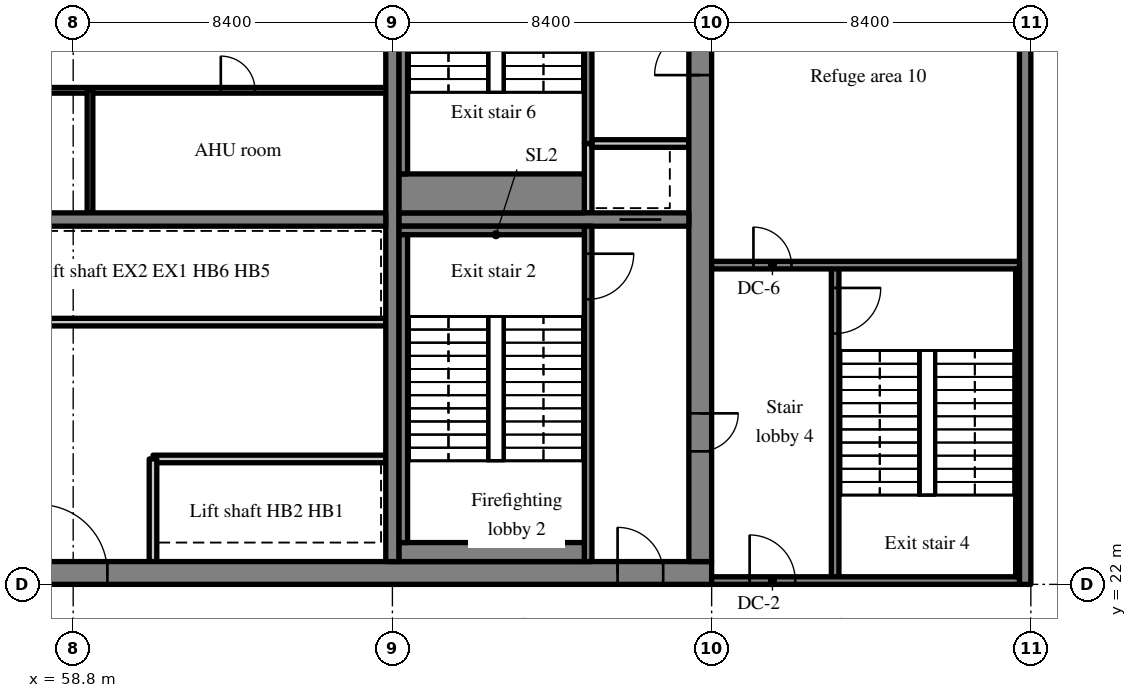
"""IFC4 building model, lengths in metres.
Left out: names, types, materials, properties, quantities, classifications, styles, units other than length and angle.
Written with IfcOpenShell. Run it as: python <this file> out.ifc"""

import sys

from ifc_helpers import new_model, si_unit, direction, frame, frame_2d, origin, place, context, subcontext, project, spatial, rectangle, extrude, source, transform, mapped, element, fill, save


model = new_model("IFC4")
c1 = context("Model", 3, precision=1e-05, world=origin(), true_north=direction((0.0, 1.0)))
c2 = subcontext(c1, "Body", "Model", "MODEL_VIEW")
j1 = project(units=[si_unit("LENGTHUNIT", "METRE"), si_unit("PLANEANGLEUNIT", "RADIAN")], contexts=[c1])
p1 = place(None, origin())
s1 = spatial("IfcSite", under=j1, at=p1, CompositionType="ELEMENT")
p2 = place(p1, origin())
s2 = spatial("IfcBuilding", under=s1, at=p2, CompositionType="ELEMENT")
p3 = place(p2, frame((0.0, 0.0, 206.4)))
s3 = spatial("IfcBuildingStorey", under=s2, at=p3, CompositionType="ELEMENT", Elevation=206.4)
m1 = source(origin(), c2, "Body", "SweptSolid", [
    extrude(rectangle(XDim=50.4, YDim=0.6, at=frame_2d((25.2, 0.0))), origin(), (0.0, 0.0, 1.0), 7.32),
])
p4 = place(p3, frame((25.2, 22.3, 0.0), z_axis=(0.0, 0.0, 1.0), x_axis=(1.0, 0.0, 0.0)))
e1 = element("IfcWall", 1, at=p4, inside=s3, PredefinedType="SHEAR", context=c2, shape_type="MappedRepresentation", body=[
    mapped(m1, transform((0.0, 0.0, 0.0), scale=1.0)),
])
m2 = source(origin(), c2, "Body", "SweptSolid", [
    extrude(rectangle(XDim=1.2, YDim=2.1, at=frame_2d((0.6, 1.05))), frame((0.0, 0.31, 0.0), z_axis=(0.0, -1.0, 0.0), x_axis=(1.0, 0.0, 0.0)), (0.0, 0.0, 1.0), 0.62),
])
p5 = place(p4, frame((22.262, 0.0, 0.0)))
e2 = element("IfcOpeningElement", 2, at=p5, cuts=e1, PredefinedType="OPENING", context=c2, shape_type="MappedRepresentation", body=[
    mapped(m2, transform((0.0, 0.0, 0.0), scale=1.0)),
])
m3 = source(origin(), c2, "Body", "SweptSolid", [
    extrude(rectangle(XDim=0.9, YDim=2.1, at=frame_2d((0.45, 1.05))), frame((0.0, 0.31, 0.0), z_axis=(0.0, -1.0, 0.0), x_axis=(1.0, 0.0, 0.0)), (0.0, 0.0, 1.0), 0.62),
])
p6 = place(p4, frame((17.25, 0.0, 0.0)))
e3 = element("IfcOpeningElement", 3, at=p6, cuts=e1, PredefinedType="OPENING", context=c2, shape_type="MappedRepresentation", body=[
    mapped(m3, transform((0.0, 0.0, 0.0), scale=1.0)),
])
p7 = place(p4, frame((9.656, 0.0, 0.0)))
e4 = element("IfcOpeningElement", 4, at=p7, cuts=e1, PredefinedType="OPENING", context=c2, shape_type="MappedRepresentation", body=[
    mapped(m3, transform((0.0, 0.0, 0.0), scale=1.0)),
])
p8 = place(p4, frame((12.719, 0.0, 0.0)))
e5 = element("IfcOpeningElement", 5, at=p8, cuts=e1, PredefinedType="OPENING", context=c2, shape_type="MappedRepresentation", body=[
    mapped(m3, transform((0.0, 0.0, 0.0), scale=1.0)),
])
m4 = source(origin(), c2, "Body", "SweptSolid", [
    extrude(rectangle(XDim=1.8, YDim=2.1, at=frame_2d((0.9, 1.05))), frame((0.0, 0.31, 0.0), z_axis=(0.0, -1.0, 0.0), x_axis=(1.0, 0.0, 0.0)), (0.0, 0.0, 1.0), 0.62),
])
p9 = place(p4, frame((32.7, 0.0, 0.0)))
e6 = element("IfcOpeningElement", 6, at=p9, cuts=e1, PredefinedType="OPENING", context=c2, shape_type="MappedRepresentation", body=[
    mapped(m4, transform((0.0, 0.0, 0.0), scale=1.0)),
])
p10 = place(p4, frame((6.488, 0.0, 0.0)))
e7 = element("IfcOpeningElement", 7, at=p10, cuts=e1, PredefinedType="OPENING", context=c2, shape_type="MappedRepresentation", body=[
    mapped(m2, transform((0.0, 0.0, 0.0), scale=1.0)),
])
p11 = place(p4, frame((47.925, 0.0, 0.0)))
e8 = element("IfcOpeningElement", 8, at=p11, cuts=e1, PredefinedType="OPENING", context=c2, shape_type="MappedRepresentation", body=[
    mapped(m2, transform((0.0, 0.0, 0.0), scale=1.0)),
])
m5 = source(origin(), c2, "Body", "SweptSolid", [
    extrude(rectangle(XDim=18.8, YDim=0.6, at=frame_2d((9.4, 0.0))), origin(), (0.0, 0.0, 1.0), 7.32),
])
p12 = place(p3, frame((75.3, 22.6, 0.0), z_axis=(0.0, 0.0, 1.0), x_axis=(0.0, 1.0, 0.0)))
e9 = element("IfcWall", 9, at=p12, inside=s3, PredefinedType="SHEAR", context=c2, shape_type="MappedRepresentation", body=[
    mapped(m5, transform((0.0, 0.0, 0.0), scale=1.0)),
])
m6 = source(origin(), c2, "Body", "SweptSolid", [
    extrude(rectangle(XDim=1.0, YDim=2.1, at=frame_2d((0.5, 1.05))), frame((0.0, 0.31, 0.0), z_axis=(0.0, -1.0, 0.0), x_axis=(1.0, 0.0, 0.0)), (0.0, 0.0, 1.0), 0.62),
])
p13 = place(p12, frame((2.9, 0.0, 0.0)))
e10 = element("IfcOpeningElement", 10, at=p13, cuts=e9, PredefinedType="OPENING", context=c2, shape_type="MappedRepresentation", body=[
    mapped(m6, transform((0.0, 0.0, 0.0), scale=1.0)),
])
p14 = place(p12, frame((12.8, 0.0, 0.0)))
e11 = element("IfcOpeningElement", 11, at=p14, cuts=e9, PredefinedType="OPENING", context=c2, shape_type="MappedRepresentation", body=[
    mapped(m2, transform((0.0, 0.0, 0.0), scale=1.0)),
])
m7 = source(origin(), c2, "Body", "SweptSolid", [
    extrude(rectangle(XDim=18.8, YDim=0.35, at=frame_2d((9.4, 0.0))), origin(), (0.0, 0.0, 1.0), 7.32),
])
p15 = place(p3, frame((67.2, 22.6, 0.0), z_axis=(0.0, 0.0, 1.0), x_axis=(0.0, 1.0, 0.0)))
e12 = element("IfcWall", 12, at=p15, inside=s3, PredefinedType="SHEAR", context=c2, shape_type="MappedRepresentation", body=[
    mapped(m7, transform((0.0, 0.0, 0.0), scale=1.0)),
])
m8 = source(origin(), c2, "Body", "SweptSolid", [
    extrude(rectangle(XDim=16.45, YDim=0.35, at=frame_2d((8.225, 0.0))), origin(), (0.0, 0.0, 1.0), 7.32),
])
p16 = place(p3, frame((50.575, 31.6, 0.0), z_axis=(0.0, 0.0, 1.0), x_axis=(1.0, 0.0, 0.0)))
e13 = element("IfcWall", 13, at=p16, inside=s3, PredefinedType="SHEAR", context=c2, shape_type="MappedRepresentation", body=[
    mapped(m8, transform((0.0, 0.0, 0.0), scale=1.0)),
])
m9 = source(origin(), c2, "Body", "SweptSolid", [
    extrude(rectangle(XDim=1.0, YDim=2.1, at=frame_2d((0.5, 1.05))), frame((0.0, 0.185, 0.0), z_axis=(0.0, -1.0, 0.0), x_axis=(1.0, 0.0, 0.0)), (0.0, 0.0, 1.0), 0.37),
])
p17 = place(p16, frame((0.613, 0.0, 0.0)))
e14 = element("IfcOpeningElement", 14, at=p17, cuts=e13, PredefinedType="OPENING", context=c2, shape_type="MappedRepresentation", body=[
    mapped(m9, transform((0.0, 0.0, 0.0), scale=1.0)),
])
m10 = source(origin(), c2, "Body", "SweptSolid", [
    extrude(rectangle(XDim=7.625, YDim=0.35, at=frame_2d((3.812, 0.0))), origin(), (0.0, 0.0, 1.0), 7.32),
])
p18 = place(p3, frame((67.375, 31.6, 0.0), z_axis=(0.0, 0.0, 1.0), x_axis=(1.0, 0.0, 0.0)))
e15 = element("IfcWall", 15, at=p18, inside=s3, PredefinedType="SHEAR", context=c2, shape_type="MappedRepresentation", body=[
    mapped(m10, transform((0.0, 0.0, 0.0), scale=1.0)),
])
m11 = source(origin(), c2, "Body", "SweptSolid", [
    extrude(rectangle(XDim=1.1, YDim=2.1, at=frame_2d((0.55, 1.05))), frame((0.0, 0.185, 0.0), z_axis=(0.0, -1.0, 0.0), x_axis=(1.0, 0.0, 0.0)), (0.0, 0.0, 1.0), 0.37),
])
p19 = place(p18, frame((5.8, 0.0, 0.0)))
e16 = element("IfcOpeningElement", 16, at=p19, cuts=e15, PredefinedType="OPENING", context=c2, shape_type="MappedRepresentation", body=[
    mapped(m11, transform((0.0, 0.0, 0.0), scale=1.0)),
])
m12 = source(origin(), c2, "Body", "SweptSolid", [
    extrude(rectangle(XDim=18.4, YDim=0.3, at=frame_2d((9.2, 0.0))), origin(), (0.0, 0.0, 1.0), 7.32),
])
p20 = place(p3, frame((83.85, 22.0, 0.0), z_axis=(0.0, 0.0, 1.0), x_axis=(0.0, 1.0, 0.0)))
e17 = element("IfcWall", 17, at=p20, inside=s3, PredefinedType="SHEAR", context=c2, shape_type="MappedRepresentation", body=[
    mapped(m12, transform((0.0, 0.0, 0.0), scale=1.0)),
])
m13 = source(origin(), c2, "Body", "SweptSolid", [
    extrude(rectangle(XDim=6.125, YDim=0.2, at=frame_2d((3.062, 0.0))), origin(), (0.0, 0.0, 1.0), 7.32),
])
p21 = place(p3, frame((67.025, 25.3, 0.0), z_axis=(0.0, 0.0, 1.0), x_axis=(-1.0, 0.0, 0.0)))
e18 = element("IfcWall", 18, at=p21, inside=s3, PredefinedType="SOLIDWALL", context=c2, shape_type="MappedRepresentation", body=[
    mapped(m13, transform((0.0, 0.0, 0.0), scale=1.0)),
])
m14 = source(origin(), c2, "Body", "SweptSolid", [
    extrude(rectangle(XDim=12.125, YDim=0.2, at=frame_2d((6.062, 0.0))), origin(), (0.0, 0.0, 1.0), 7.32),
])
p22 = place(p3, frame((67.025, 28.9, 0.0), z_axis=(0.0, 0.0, 1.0), x_axis=(-1.0, 0.0, 0.0)))
e19 = element("IfcWall", 19, at=p22, inside=s3, PredefinedType="SOLIDWALL", context=c2, shape_type="MappedRepresentation", body=[
    mapped(m14, transform((0.0, 0.0, 0.0), scale=1.0)),
])
m15 = source(origin(), c2, "Body", "SweptSolid", [
    extrude(rectangle(XDim=2.7, YDim=0.2, at=frame_2d((1.35, 0.0))), origin(), (0.0, 0.0, 1.0), 7.32),
])
p23 = place(p3, frame((60.9, 22.6, 0.0), z_axis=(0.0, 0.0, 1.0), x_axis=(0.0, 1.0, 0.0)))
e20 = element("IfcWall", 20, at=p23, inside=s3, PredefinedType="SOLIDWALL", context=c2, shape_type="MappedRepresentation", body=[
    mapped(m15, transform((0.0, 0.0, 0.0), scale=1.0)),
])
m16 = source(origin(), c2, "Body", "SweptSolid", [
    extrude(rectangle(XDim=14.225, YDim=0.15, at=frame_2d((7.112, 0.0))), origin(), (0.0, 0.0, 1.0), 7.32),
])
p24 = place(p3, frame((67.025, 35.0, 0.0), z_axis=(0.0, 0.0, 1.0), x_axis=(-1.0, 0.0, 0.0)))
e21 = element("IfcWall", 21, at=p24, inside=s3, PredefinedType="PARTITIONING", context=c2, shape_type="MappedRepresentation", body=[
    mapped(m16, transform((0.0, 0.0, 0.0), scale=1.0)),
])
m17 = source(origin(), c2, "Body", "SweptSolid", [
    extrude(rectangle(XDim=0.9, YDim=2.1, at=frame_2d((0.45, 1.05))), frame((0.0, 0.085, 0.0), z_axis=(0.0, -1.0, 0.0), x_axis=(1.0, 0.0, 0.0)), (0.0, 0.0, 1.0), 0.17),
])
p25 = place(p24, frame((3.441, 0.0, 0.0)))
e22 = element("IfcOpeningElement", 22, at=p25, cuts=e21, PredefinedType="OPENING", context=c2, shape_type="MappedRepresentation", body=[
    mapped(m17, transform((0.0, 0.0, 0.0), scale=1.0)),
])
p26 = place(p24, frame((10.516, 0.0, 0.0)))
e23 = element("IfcOpeningElement", 23, at=p26, cuts=e21, PredefinedType="OPENING", context=c2, shape_type="MappedRepresentation", body=[
    mapped(m17, transform((0.0, 0.0, 0.0), scale=1.0)),
])
m18 = source(origin(), c2, "Body", "SweptSolid", [
    extrude(rectangle(XDim=3.225, YDim=0.15, at=frame_2d((1.613, 0.0))), origin(), (0.0, 0.0, 1.0), 7.32),
])
p27 = place(p3, frame((59.242, 31.775, 0.0), z_axis=(0.0, 0.0, 1.0), x_axis=(0.0, 1.0, 0.0)))
e24 = element("IfcWall", 24, at=p27, inside=s3, PredefinedType="PARTITIONING", context=c2, shape_type="MappedRepresentation", body=[
    mapped(m18, transform((0.0, 0.0, 0.0), scale=1.0)),
])
m19 = source(origin(), c2, "Body", "SweptSolid", [
    extrude(rectangle(XDim=8.825, YDim=0.2, at=frame_2d((4.413, 0.0))), origin(), (0.0, 0.0, 1.0), 7.32),
])
p28 = place(p3, frame((72.35, 22.6, 0.0), z_axis=(0.0, 0.0, 1.0), x_axis=(0.0, 1.0, 0.0)))
e25 = element("IfcWall", 25, at=p28, inside=s3, PredefinedType="SOLIDWALL", context=c2, shape_type="MappedRepresentation", body=[
    mapped(m19, transform((0.0, 0.0, 0.0), scale=1.0)),
])
m20 = source(origin(), c2, "Body", "SweptSolid", [
    extrude(rectangle(XDim=1.2, YDim=2.1, at=frame_2d((0.6, 1.05))), frame((0.0, 0.11, 0.0), z_axis=(0.0, -1.0, 0.0), x_axis=(1.0, 0.0, 0.0)), (0.0, 0.0, 1.0), 0.22),
])
p29 = place(p28, frame((6.9, 0.0, 0.0)))
e26 = element("IfcOpeningElement", 26, at=p29, cuts=e25, PredefinedType="OPENING", context=c2, shape_type="MappedRepresentation", body=[
    mapped(m20, transform((0.0, 0.0, 0.0), scale=1.0)),
])
m21 = source(origin(), c2, "Body", "SweptSolid", [
    extrude(rectangle(XDim=1.825, YDim=0.2, at=frame_2d((0.913, 0.0))), origin(), (0.0, 0.0, 1.0), 7.32),
])
p30 = place(p3, frame((72.35, 31.775, 0.0), z_axis=(0.0, 0.0, 1.0), x_axis=(0.0, 1.0, 0.0)))
e27 = element("IfcWall", 27, at=p30, inside=s3, PredefinedType="SOLIDWALL", context=c2, shape_type="MappedRepresentation", body=[
    mapped(m21, transform((0.0, 0.0, 0.0), scale=1.0)),
])
m22 = source(origin(), c2, "Body", "SweptSolid", [
    extrude(rectangle(XDim=2.55, YDim=0.2, at=frame_2d((1.275, 0.0))), origin(), (0.0, 0.0, 1.0), 7.32),
])
p31 = place(p3, frame((72.45, 33.6, 0.0), z_axis=(0.0, 0.0, 1.0), x_axis=(1.0, 0.0, 0.0)))
e28 = element("IfcWall", 28, at=p31, inside=s3, PredefinedType="SOLIDWALL", context=c2, shape_type="MappedRepresentation", body=[
    mapped(m22, transform((0.0, 0.0, 0.0), scale=1.0)),
])
m23 = source(origin(), c2, "Body", "SweptSolid", [
    extrude(rectangle(XDim=7.8, YDim=0.2, at=frame_2d((3.9, 0.0))), origin(), (0.0, 0.0, 1.0), 7.32),
])
p32 = place(p3, frame((72.35, 33.6, 0.0), z_axis=(0.0, 0.0, 1.0), x_axis=(0.0, 1.0, 0.0)))
e29 = element("IfcWall", 29, at=p32, inside=s3, PredefinedType="SOLIDWALL", context=c2, shape_type="MappedRepresentation", body=[
    mapped(m23, transform((0.0, 0.0, 0.0), scale=1.0)),
])
m24 = source(origin(), c2, "Body", "SweptSolid", [
    extrude(rectangle(XDim=1.8, YDim=2.1, at=frame_2d((0.9, 1.05))), frame((0.0, 0.11, 0.0), z_axis=(0.0, -1.0, 0.0), x_axis=(1.0, 0.0, 0.0)), (0.0, 0.0, 1.0), 0.22),
])
p33 = place(p32, frame((5.3, 0.0, 0.0)))
e30 = element("IfcOpeningElement", 30, at=p33, cuts=e29, PredefinedType="OPENING", context=c2, shape_type="MappedRepresentation", body=[
    mapped(m24, transform((0.0, 0.0, 0.0), scale=1.0)),
])
m25 = source(origin(), c2, "Body", "SweptSolid", [
    extrude(rectangle(XDim=8.3, YDim=0.2, at=frame_2d((4.15, 0.0))), origin(), (0.0, 0.0, 1.0), 7.32),
])
p34 = place(p3, frame((78.85, 22.1, 0.0), z_axis=(0.0, 0.0, 1.0), x_axis=(0.0, 1.0, 0.0)))
e31 = element("IfcWall", 31, at=p34, inside=s3, PredefinedType="SOLIDWALL", context=c2, shape_type="MappedRepresentation", body=[
    mapped(m25, transform((0.0, 0.0, 0.0), scale=1.0)),
])
p35 = place(p34, frame((6.5, 0.0, 0.0)))
e32 = element("IfcOpeningElement", 32, at=p35, cuts=e31, PredefinedType="OPENING", context=c2, shape_type="MappedRepresentation", body=[
    mapped(m20, transform((0.0, 0.0, 0.0), scale=1.0)),
])
m26 = source(origin(), c2, "Body", "SweptSolid", [
    extrude(rectangle(XDim=8.1, YDim=0.2, at=frame_2d((4.05, 0.0))), origin(), (0.0, 0.0, 1.0), 7.32),
])
p36 = place(p3, frame((83.7, 22.1, 0.0), z_axis=(0.0, 0.0, 1.0), x_axis=(-1.0, 0.0, 0.0)))
e33 = element("IfcWall", 33, at=p36, inside=s3, PredefinedType="SOLIDWALL", context=c2, shape_type="MappedRepresentation", body=[
    mapped(m26, transform((0.0, 0.0, 0.0), scale=1.0)),
])
p37 = place(p36, frame((5.9, 0.0, 0.0)))
e34 = element("IfcOpeningElement", 34, at=p37, cuts=e33, PredefinedType="OPENING", context=c2, shape_type="MappedRepresentation", body=[
    mapped(m20, transform((0.0, 0.0, 0.0), scale=1.0)),
])
p38 = place(p3, frame((83.7, 30.4, 0.0), z_axis=(0.0, 0.0, 1.0), x_axis=(-1.0, 0.0, 0.0)))
e35 = element("IfcWall", 35, at=p38, inside=s3, PredefinedType="SOLIDWALL", context=c2, shape_type="MappedRepresentation", body=[
    mapped(m26, transform((0.0, 0.0, 0.0), scale=1.0)),
])
m27 = source(origin(), c2, "Body", "SweptSolid", [
    extrude(rectangle(XDim=1.0, YDim=2.1, at=frame_2d((0.5, 1.05))), frame((0.0, 0.11, 0.0), z_axis=(0.0, -1.0, 0.0), x_axis=(1.0, 0.0, 0.0)), (0.0, 0.0, 1.0), 0.22),
])
p39 = place(p38, frame((6.0, 0.0, 0.0)))
e36 = element("IfcOpeningElement", 36, at=p39, cuts=e35, PredefinedType="OPENING", context=c2, shape_type="MappedRepresentation", body=[
    mapped(m27, transform((0.0, 0.0, 0.0), scale=1.0)),
])
m28 = source(origin(), c2, "Body", "SweptSolid", [
    extrude(rectangle(XDim=4.875, YDim=0.5, at=frame_2d((2.438, 0.0))), origin(), (0.0, 0.0, 1.0), 7.32),
])
p40 = place(p3, frame((67.375, 22.85, 0.0), z_axis=(0.0, 0.0, 1.0), x_axis=(1.0, 0.0, 0.0)))
e37 = element("IfcWall", 37, at=p40, inside=s3, PredefinedType="SOLIDWALL", context=c2, shape_type="MappedRepresentation", body=[
    mapped(m28, transform((0.0, 0.0, 0.0), scale=1.0)),
])
m29 = source(origin(), c2, "Body", "SweptSolid", [
    extrude(rectangle(XDim=4.875, YDim=0.225, at=frame_2d((2.438, 0.0))), origin(), (0.0, 0.0, 1.0), 7.32),
])
p41 = place(p3, frame((67.375, 31.312, 0.0), z_axis=(0.0, 0.0, 1.0), x_axis=(1.0, 0.0, 0.0)))
e38 = element("IfcWall", 38, at=p41, inside=s3, PredefinedType="SOLIDWALL", context=c2, shape_type="MappedRepresentation", body=[
    mapped(m29, transform((0.0, 0.0, 0.0), scale=1.0)),
])
m30 = source(origin(), c2, "Body", "SweptSolid", [
    extrude(rectangle(XDim=8.1, YDim=0.225, at=frame_2d((4.05, 0.0))), origin(), (0.0, 0.0, 1.0), 7.32),
])
p42 = place(p3, frame((67.487, 23.1, 0.0), z_axis=(0.0, 0.0, 1.0), x_axis=(0.0, 1.0, 0.0)))
e39 = element("IfcWall", 39, at=p42, inside=s3, PredefinedType="SOLIDWALL", context=c2, shape_type="MappedRepresentation", body=[
    mapped(m30, transform((0.0, 0.0, 0.0), scale=1.0)),
])
m31 = source(origin(), c2, "Body", "SweptSolid", [
    extrude(rectangle(XDim=4.875, YDim=1.025, at=frame_2d((2.438, 0.0))), origin(), (0.0, 0.0, 1.0), 7.32),
])
p43 = place(p3, frame((67.375, 32.287, 0.0), z_axis=(0.0, 0.0, 1.0), x_axis=(1.0, 0.0, 0.0)))
e40 = element("IfcWall", 40, at=p43, inside=s3, PredefinedType="SOLIDWALL", context=c2, shape_type="MappedRepresentation", body=[
    mapped(m31, transform((0.0, 0.0, 0.0), scale=1.0)),
])
p44 = place(p3, frame((67.487, 32.8, 0.0), z_axis=(0.0, 0.0, 1.0), x_axis=(0.0, 1.0, 0.0)))
e41 = element("IfcWall", 41, at=p44, inside=s3, PredefinedType="SOLIDWALL", context=c2, shape_type="MappedRepresentation", body=[
    mapped(m30, transform((0.0, 0.0, 0.0), scale=1.0)),
])
m32 = source(origin(), c2, "Body", "SweptSolid", [
    extrude(rectangle(XDim=8.1, YDim=0.1, at=frame_2d((4.05, 0.0))), origin(), (0.0, 0.0, 1.0), 7.32),
])
p45 = place(p3, frame((83.65, 22.2, 0.0), z_axis=(0.0, 0.0, 1.0), x_axis=(0.0, 1.0, 0.0)))
e42 = element("IfcWall", 42, at=p45, inside=s3, PredefinedType="SOLIDWALL", context=c2, shape_type="MappedRepresentation", body=[
    mapped(m32, transform((0.0, 0.0, 0.0), scale=1.0)),
])
m33 = source(origin(), c2, "Body", "SweptSolid", [
    extrude(rectangle(XDim=1.8, YDim=2.1, at=frame_2d((0.9, 1.05))), frame((0.0, 0.225, 0.0), z_axis=(0.0, -1.0, 0.0), x_axis=(1.0, 0.0, 0.0)), (0.0, 0.0, 1.0), 0.05),
])
p46 = place(p9, origin())
e43 = element("IfcDoor", 43, at=p46, inside=s3, OperationType="DOUBLE_DOOR_SINGLE_SWING", PredefinedType="DOOR", context=c2, shape_type="MappedRepresentation", body=[
    mapped(m33, transform((0.0, 0.0, 0.0), scale=1.0)),
])
fill(e6, e43)
m34 = source(origin(), c2, "Body", "SweptSolid", [
    extrude(rectangle(XDim=0.9, YDim=2.1, at=frame_2d((0.45, 1.05))), frame((0.0, 0.025, 0.0), z_axis=(0.0, -1.0, 0.0), x_axis=(1.0, 0.0, 0.0)), (0.0, 0.0, 1.0), 0.05),
])
p47 = place(p25, origin())
e44 = element("IfcDoor", 44, at=p47, inside=s3, OperationType="SINGLE_SWING_RIGHT", PredefinedType="DOOR", context=c2, shape_type="MappedRepresentation", body=[
    mapped(m34, transform((0.0, 0.0, 0.0), scale=1.0)),
])
fill(e22, e44)
m35 = source(origin(), c2, "Body", "SweptSolid", [
    extrude(rectangle(XDim=1.2, YDim=2.1, at=frame_2d((0.6, 1.05))), frame((0.0, 0.025, 0.0), z_axis=(0.0, -1.0, 0.0), x_axis=(1.0, 0.0, 0.0)), (0.0, 0.0, 1.0), 0.05),
])
p48 = place(p29, origin())
e45 = element("IfcDoor", 45, at=p48, inside=s3, OperationType="SINGLE_SWING_RIGHT", PredefinedType="DOOR", context=c2, shape_type="MappedRepresentation", body=[
    mapped(m35, transform((0.0, 0.0, 0.0), scale=1.0)),
])
fill(e26, e45)
m36 = source(origin(), c2, "Body", "SweptSolid", [
    extrude(rectangle(XDim=1.2, YDim=2.1, at=frame_2d((0.6, 1.05))), frame((0.0, 0.225, 0.0), z_axis=(0.0, -1.0, 0.0), x_axis=(1.0, 0.0, 0.0)), (0.0, 0.0, 1.0), 0.05),
])
p49 = place(p11, origin())
e46 = element("IfcDoor", 46, at=p49, inside=s3, OperationType="SINGLE_SWING_LEFT", PredefinedType="DOOR", context=c2, shape_type="MappedRepresentation", body=[
    mapped(m36, transform((0.0, 0.0, 0.0), scale=1.0)),
])
fill(e8, e46)
m37 = source(origin(), c2, "Body", "SweptSolid", [
    extrude(rectangle(XDim=1.1, YDim=2.1, at=frame_2d((0.55, 1.05))), frame((0.0, 0.025, 0.0), z_axis=(0.0, -1.0, 0.0), x_axis=(1.0, 0.0, 0.0)), (0.0, 0.0, 1.0), 0.05),
])
p50 = place(p19, origin())
e47 = element("IfcDoor", 47, at=p50, inside=s3, OperationType="SLIDING_TO_LEFT", PredefinedType="DOOR", context=c2, shape_type="MappedRepresentation", body=[
    mapped(m37, transform((0.0, 0.0, 0.0), scale=1.0)),
])
fill(e16, e47)
m38 = source(origin(), c2, "Body", "SweptSolid", [
    extrude(rectangle(XDim=1.0, YDim=2.1, at=frame_2d((0.5, 1.05))), frame((0.0, 0.025, 0.0), z_axis=(0.0, -1.0, 0.0), x_axis=(1.0, 0.0, 0.0)), (0.0, 0.0, 1.0), 0.05),
])
p51 = place(p13, origin())
e48 = element("IfcDoor", 48, at=p51, inside=s3, OperationType="SINGLE_SWING_RIGHT", PredefinedType="DOOR", context=c2, shape_type="MappedRepresentation", body=[
    mapped(m38, transform((0.0, 0.0, 0.0), scale=1.0)),
])
fill(e10, e48)
p52 = place(p14, origin())
e49 = element("IfcDoor", 49, at=p52, inside=s3, OperationType="SINGLE_SWING_LEFT", PredefinedType="DOOR", context=c2, shape_type="MappedRepresentation", body=[
    mapped(m35, transform((0.0, 0.0, 0.0), scale=1.0)),
])
fill(e11, e49)
p53 = place(p35, origin())
e50 = element("IfcDoor", 50, at=p53, inside=s3, OperationType="SINGLE_SWING_RIGHT", PredefinedType="DOOR", context=c2, shape_type="MappedRepresentation", body=[
    mapped(m35, transform((0.0, 0.0, 0.0), scale=1.0)),
])
fill(e32, e50)
p54 = place(p37, origin())
e51 = element("IfcDoor", 51, at=p54, inside=s3, OperationType="SINGLE_SWING_RIGHT", PredefinedType="DOOR", context=c2, shape_type="MappedRepresentation", body=[
    mapped(m35, transform((0.0, 0.0, 0.0), scale=1.0)),
])
fill(e34, e51)
p55 = place(p39, origin())
e52 = element("IfcDoor", 52, at=p55, inside=s3, OperationType="SINGLE_SWING_RIGHT", PredefinedType="DOOR", context=c2, shape_type="MappedRepresentation", body=[
    mapped(m38, transform((0.0, 0.0, 0.0), scale=1.0)),
])
fill(e36, e52)
save(model, sys.argv[1])
